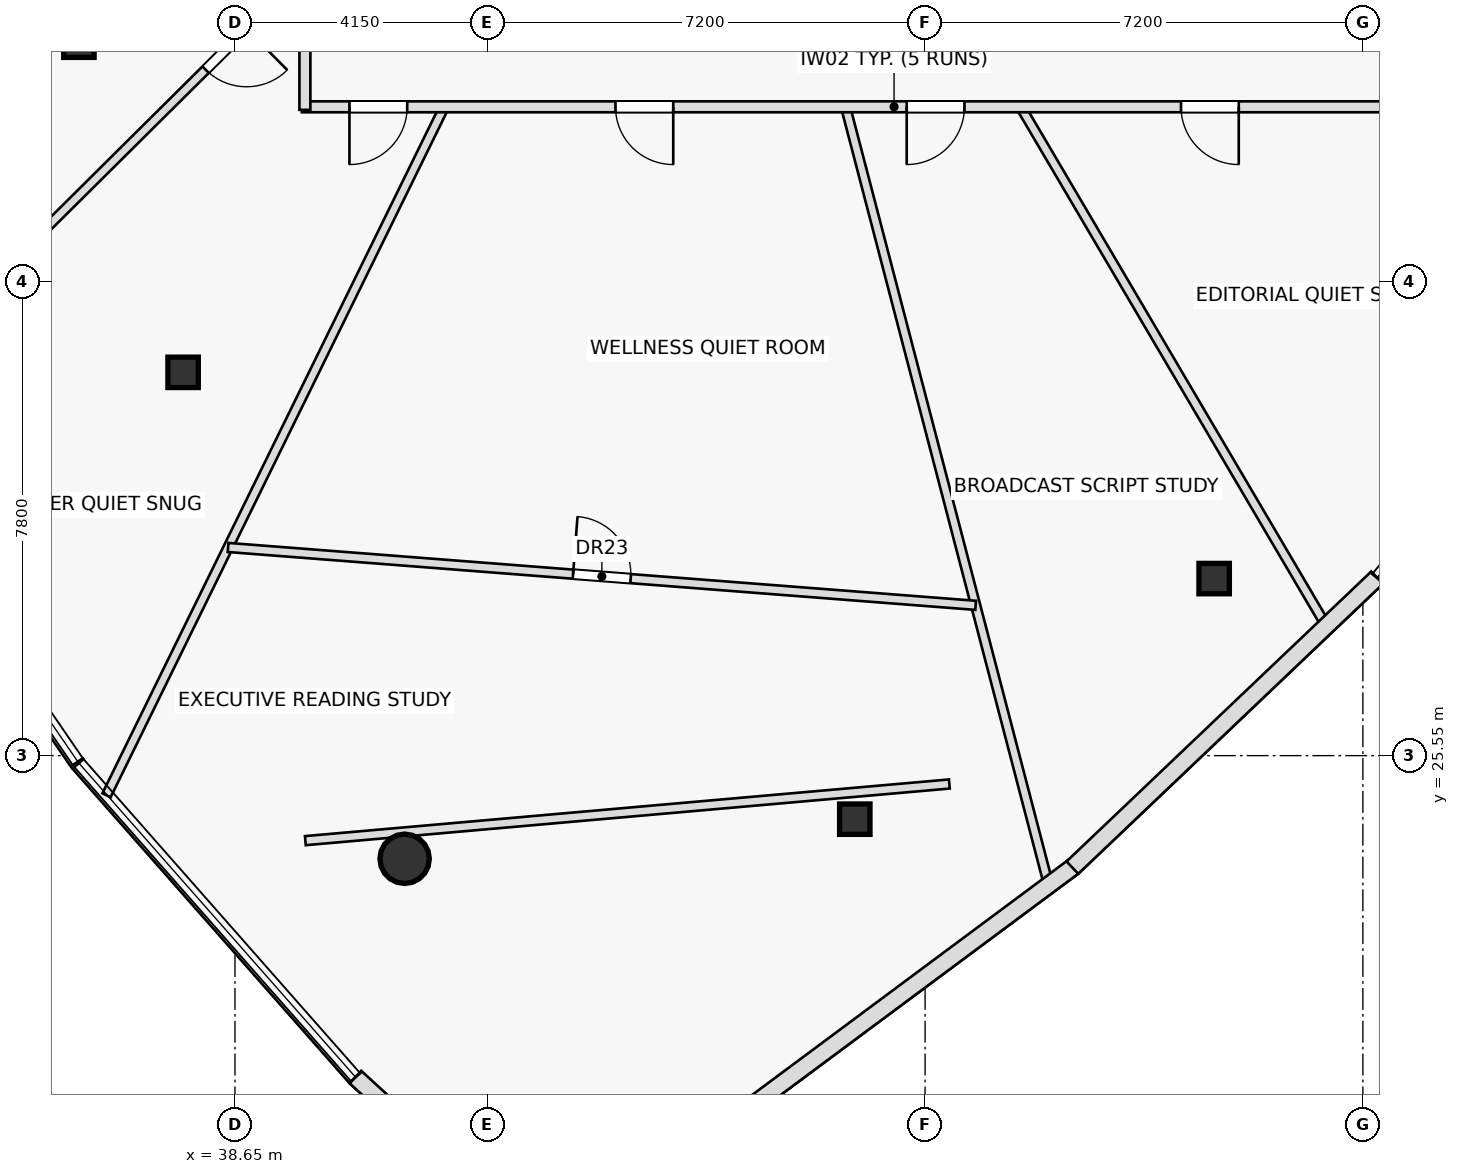
"""IFC4 building model, lengths in metres.
Left out: names, types, materials, properties, quantities, classifications, styles, units other than length and angle.
Written with IfcOpenShell. Run it as: python <this file> out.ifc"""

import sys

from ifc_helpers import new_model, si_unit, direction, frame, frame_2d, origin, origin_2d, place, context, subcontext, project, spatial, rectangle, hollow_rectangle, hollow_circle, extrude, element, fill, save


model = new_model("IFC4")
c1 = context("Model", 3, precision=1e-05, world=origin(), true_north=direction((0.0, 1.0)))
c2 = subcontext(c1, "Body", "Model", "MODEL_VIEW")
j1 = project(units=[si_unit("LENGTHUNIT", "METRE"), si_unit("PLANEANGLEUNIT", "RADIAN")], contexts=[c1])
p1 = place(None, origin())
s1 = spatial("IfcSite", under=j1, at=p1, CompositionType="ELEMENT")
p2 = place(p1, origin())
s2 = spatial("IfcBuilding", under=s1, at=p2, CompositionType="ELEMENT")
p3 = place(p2, frame((0.0, 0.0, 269.55)))
s3 = spatial("IfcBuildingStorey", under=s2, at=p3, CompositionType="ELEMENT", Elevation=269.55)
for number, where, z_axis, x_axis in (
    (1, (36.083, 37.282, 0.0), (0.0, 0.0, 1.0), (1.0, 0.0, 0.0)),
    (2, (37.797, 31.853, 0.0), (0.0, 0.0, 1.0), (1.0, 0.0, 0.0)),
):
    element("IfcColumn", number, at=place(p3, frame(where, z_axis=z_axis, x_axis=x_axis)), inside=s3, PredefinedType="COLUMN", context=c2, shape_type="SweptSolid", body=[
        extrude(hollow_rectangle(XDim=0.5, YDim=0.5, WallThickness=0.03, at=origin_2d()), origin(), (0.0, 0.0, 1.0), 3.5),
    ])
p4 = place(p3, frame((41.44, 23.854, 0.0), z_axis=(0.0, 0.0, 1.0), x_axis=(1.0, 0.0, 0.0)))
e3 = element("IfcColumn", 3, at=p4, inside=s3, PredefinedType="COLUMN", context=c2, shape_type="SweptSolid", body=[
    extrude(hollow_circle(Radius=0.406, WallThickness=0.036, at=origin_2d()), origin(), (0.0, 0.0, 1.0), 3.5),
])
for number, where, z_axis, x_axis in (
    (4, (48.844, 24.505, 0.0), (0.0, 0.0, 1.0), (1.0, 0.0, 0.0)),
    (5, (54.754, 28.462, 0.0), (0.0, 0.0, 1.0), (1.0, 0.0, 0.0)),
):
    element("IfcColumn", number, at=place(p3, frame(where, z_axis=z_axis, x_axis=x_axis)), inside=s3, PredefinedType="COLUMN", context=c2, shape_type="SweptSolid", body=[
        extrude(hollow_rectangle(XDim=0.5, YDim=0.5, WallThickness=0.03, at=origin_2d()), origin(), (0.0, 0.0, 1.0), 3.5),
    ])
p5 = place(p3, frame((39.808, 24.152, 0.0), z_axis=(0.0, 0.0, 1.0), x_axis=(0.996153584085, 0.087624408208, 0.0)))
e6 = element("IfcWall", 6, at=p5, inside=s3, PredefinedType="PARTITIONING", context=c2, shape_type="SweptSolid", body=[
    extrude(rectangle(XDim=10.632, YDim=0.15, at=frame_2d((5.316, 0.0))), origin(), (0.0, 0.0, 1.0), 2.195),
])
p6 = place(p3, frame((39.8, 38.45, 0.0), z_axis=(0.0, 0.0, 1.0), x_axis=(-0.70980455897, -0.704398671254, 0.0)))
e7 = element("IfcWall", 7, at=p6, inside=s3, PredefinedType="PARTITIONING", context=c2, shape_type="SweptSolid", body=[
    extrude(rectangle(XDim=10.613, YDim=0.15, at=frame_2d((5.307, 0.0))), origin(), (0.0, 0.0, 1.0), 2.195),
])
p7 = place(p6, frame((1.35, 0.0, 0.0)))
e8 = element("IfcOpeningElement", 8, at=p7, cuts=e7, PredefinedType="OPENING", context=c2, shape_type="SweptSolid", body=[
    extrude(rectangle(XDim=0.95, YDim=2.05, at=frame_2d((0.475, 1.025))), frame((0.0, 0.085, 0.0), z_axis=(0.0, -1.0, 0.0), x_axis=(1.0, 0.0, 0.0)), (0.0, 0.0, 1.0), 0.17),
])
p8 = place(p3, frame((42.092, 36.22, 0.0), z_axis=(0.0, 0.0, 1.0), x_axis=(-0.440464441774, -0.89777005716, 0.0)))
e9 = element("IfcWall", 9, at=p8, inside=s3, PredefinedType="PARTITIONING", context=c2, shape_type="SweptSolid", body=[
    extrude(rectangle(XDim=12.612, YDim=0.15, at=frame_2d((6.306, 0.0))), origin(), (0.0, 0.0, 1.0), 2.195),
])
p9 = place(p3, frame((48.692, 36.22, 0.0), z_axis=(0.0, 0.0, 1.0), x_axis=(0.25255026426, -0.967583776229, 0.0)))
e10 = element("IfcWall", 10, at=p9, inside=s3, PredefinedType="PARTITIONING", context=c2, shape_type="SweptSolid", body=[
    extrude(rectangle(XDim=13.239, YDim=0.15, at=frame_2d((6.62, 0.0))), origin(), (0.0, 0.0, 1.0), 2.195),
])
p10 = place(p3, frame((51.571, 36.22, 0.0), z_axis=(0.0, 0.0, 1.0), x_axis=(0.507449243591, -0.861681649555, 0.0)))
e11 = element("IfcWall", 11, at=p10, inside=s3, PredefinedType="PARTITIONING", context=c2, shape_type="SweptSolid", body=[
    extrude(rectangle(XDim=9.919, YDim=0.15, at=frame_2d((4.959, 0.0))), origin(), (0.0, 0.0, 1.0), 2.195),
])
p11 = place(p3, frame((38.537, 28.973, 0.0), z_axis=(0.0, 0.0, 1.0), x_axis=(0.997017686542, -0.077173393875, 0.0)))
e12 = element("IfcWall", 12, at=p11, inside=s3, PredefinedType="PARTITIONING", context=c2, shape_type="SweptSolid", body=[
    extrude(rectangle(XDim=12.332, YDim=0.15, at=frame_2d((6.166, 0.0))), origin(), (0.0, 0.0, 1.0), 2.195),
])
p12 = place(p11, frame((5.691, 0.0, 0.0)))
e13 = element("IfcOpeningElement", 13, at=p12, cuts=e12, PredefinedType="OPENING", context=c2, shape_type="SweptSolid", body=[
    extrude(rectangle(XDim=0.95, YDim=2.05, at=frame_2d((0.475, 1.025))), frame((0.0, 0.085, 0.0), z_axis=(0.0, -1.0, 0.0), x_axis=(1.0, 0.0, 0.0)), (0.0, 0.0, 1.0), 0.17),
])
p13 = place(p3, frame((59.23, 36.22, 0.0), z_axis=(0.0, 0.0, 1.0), x_axis=(-1.0, 0.0, 0.0)))
e14 = element("IfcWall", 14, at=p13, inside=s3, PredefinedType="PARTITIONING", context=c2, shape_type="SweptSolid", body=[
    extrude(rectangle(XDim=19.48, YDim=0.18, at=frame_2d((9.74, 0.0))), origin(), (0.0, 0.0, 1.0), 2.195),
])
p14 = place(p13, frame((4.071, 0.0, 0.0)))
e15 = element("IfcOpeningElement", 15, at=p14, cuts=e14, PredefinedType="OPENING", context=c2, shape_type="SweptSolid", body=[
    extrude(rectangle(XDim=0.95, YDim=2.05, at=frame_2d((0.475, 1.025))), frame((0.0, 0.1, 0.0), z_axis=(0.0, -1.0, 0.0), x_axis=(1.0, 0.0, 0.0)), (0.0, 0.0, 1.0), 0.2),
])
p15 = place(p13, frame((8.583, 0.0, 0.0)))
e16 = element("IfcOpeningElement", 16, at=p15, cuts=e14, PredefinedType="OPENING", context=c2, shape_type="SweptSolid", body=[
    extrude(rectangle(XDim=0.95, YDim=2.05, at=frame_2d((0.475, 1.025))), frame((0.0, 0.1, 0.0), z_axis=(0.0, -1.0, 0.0), x_axis=(1.0, 0.0, 0.0)), (0.0, 0.0, 1.0), 0.2),
])
p16 = place(p13, frame((13.372, 0.0, 0.0)))
e17 = element("IfcOpeningElement", 17, at=p16, cuts=e14, PredefinedType="OPENING", context=c2, shape_type="SweptSolid", body=[
    extrude(rectangle(XDim=0.95, YDim=2.05, at=frame_2d((0.475, 1.025))), frame((0.0, 0.1, 0.0), z_axis=(0.0, -1.0, 0.0), x_axis=(1.0, 0.0, 0.0)), (0.0, 0.0, 1.0), 0.2),
])
p17 = place(p13, frame((17.747, 0.0, 0.0)))
e18 = element("IfcOpeningElement", 18, at=p17, cuts=e14, PredefinedType="OPENING", context=c2, shape_type="SweptSolid", body=[
    extrude(rectangle(XDim=0.95, YDim=2.05, at=frame_2d((0.475, 1.025))), frame((0.0, 0.1, 0.0), z_axis=(0.0, -1.0, 0.0), x_axis=(1.0, 0.0, 0.0)), (0.0, 0.0, 1.0), 0.2),
])
p18 = place(p3, frame((39.8, 36.17, 0.0), z_axis=(0.0, 0.0, 1.0), x_axis=(0.0, 1.0, 0.0)))
e19 = element("IfcWall", 19, at=p18, inside=s3, PredefinedType="PARTITIONING", context=c2, shape_type="SweptSolid", body=[
    extrude(rectangle(XDim=4.08, YDim=0.18, at=frame_2d((2.04, 0.0))), origin(), (0.0, 0.0, 1.0), 2.195),
])
p19 = place(p3, frame((40.631, 20.264, 0.0), z_axis=(0.0, 0.0, 1.0), x_axis=(0.737903232737, -0.674906526207, 0.0)))
e20 = element("IfcWall", 20, at=p19, inside=s3, PredefinedType="STANDARD", context=c2, shape_type="SweptSolid", body=[
    extrude(rectangle(XDim=1.798, YDim=0.28, at=frame_2d((0.899, 0.0))), origin(), (0.0, 0.0, 1.0), 3.5),
])
p20 = place(p3, frame((46.884, 19.594, 0.0), z_axis=(0.0, 0.0, 1.0), x_axis=(0.802567445084, 0.596561393396, 0.0)))
e21 = element("IfcWall", 21, at=p20, inside=s3, PredefinedType="STANDARD", context=c2, shape_type="SweptSolid", body=[
    extrude(rectangle(XDim=6.929, YDim=0.28, at=frame_2d((3.465, 0.0))), origin(), (0.0, 0.0, 1.0), 3.5),
])
p21 = place(p3, frame((52.423, 23.708, 0.0), z_axis=(0.0, 0.0, 1.0), x_axis=(0.724498737337, 0.68927612725, 0.0)))
e22 = element("IfcWall", 22, at=p21, inside=s3, PredefinedType="STANDARD", context=c2, shape_type="SweptSolid", body=[
    extrude(rectangle(XDim=6.917, YDim=0.28, at=frame_2d((3.459, 0.0))), origin(), (0.0, 0.0, 1.0), 3.5),
])
p22 = place(p7, origin())
e23 = element("IfcDoor", 23, at=p22, inside=s3, OperationType="SINGLE_SWING_LEFT", PredefinedType="DOOR", context=c2, shape_type="SweptSolid", body=[
    extrude(rectangle(XDim=0.95, YDim=2.05, at=frame_2d((0.475, 1.025))), frame((0.0, 0.025, 0.0), z_axis=(0.0, -1.0, 0.0), x_axis=(1.0, 0.0, 0.0)), (0.0, 0.0, 1.0), 0.05),
])
fill(e8, e23)
p23 = place(p12, origin())
e24 = element("IfcDoor", 24, at=p23, inside=s3, OperationType="SINGLE_SWING_LEFT", PredefinedType="DOOR", context=c2, shape_type="SweptSolid", body=[
    extrude(rectangle(XDim=0.95, YDim=2.05, at=frame_2d((0.475, 1.025))), frame((0.0, 0.025, 0.0), z_axis=(0.0, -1.0, 0.0), x_axis=(1.0, 0.0, 0.0)), (0.0, 0.0, 1.0), 0.05),
])
fill(e13, e24)
p24 = place(p14, origin())
e25 = element("IfcDoor", 25, at=p24, inside=s3, OperationType="SINGLE_SWING_LEFT", PredefinedType="DOOR", context=c2, shape_type="SweptSolid", body=[
    extrude(rectangle(XDim=0.95, YDim=2.05, at=frame_2d((0.475, 1.025))), frame((0.0, 0.025, 0.0), z_axis=(0.0, -1.0, 0.0), x_axis=(1.0, 0.0, 0.0)), (0.0, 0.0, 1.0), 0.05),
])
fill(e15, e25)
p25 = place(p15, origin())
e26 = element("IfcDoor", 26, at=p25, inside=s3, OperationType="SINGLE_SWING_RIGHT", PredefinedType="DOOR", context=c2, shape_type="SweptSolid", body=[
    extrude(rectangle(XDim=0.95, YDim=2.05, at=frame_2d((0.475, 1.025))), frame((0.0, 0.025, 0.0), z_axis=(0.0, -1.0, 0.0), x_axis=(1.0, 0.0, 0.0)), (0.0, 0.0, 1.0), 0.05),
])
fill(e16, e26)
p26 = place(p16, origin())
e27 = element("IfcDoor", 27, at=p26, inside=s3, OperationType="SINGLE_SWING_LEFT", PredefinedType="DOOR", context=c2, shape_type="SweptSolid", body=[
    extrude(rectangle(XDim=0.95, YDim=2.05, at=frame_2d((0.475, 1.025))), frame((0.0, 0.025, 0.0), z_axis=(0.0, -1.0, 0.0), x_axis=(1.0, 0.0, 0.0)), (0.0, 0.0, 1.0), 0.05),
])
fill(e17, e27)
p27 = place(p17, origin())
e28 = element("IfcDoor", 28, at=p27, inside=s3, OperationType="SINGLE_SWING_RIGHT", PredefinedType="DOOR", context=c2, shape_type="SweptSolid", body=[
    extrude(rectangle(XDim=0.95, YDim=2.05, at=frame_2d((0.475, 1.025))), frame((0.0, 0.025, 0.0), z_axis=(0.0, -1.0, 0.0), x_axis=(1.0, 0.0, 0.0)), (0.0, 0.0, 1.0), 0.05),
])
fill(e18, e28)
save(model, sys.argv[1])
